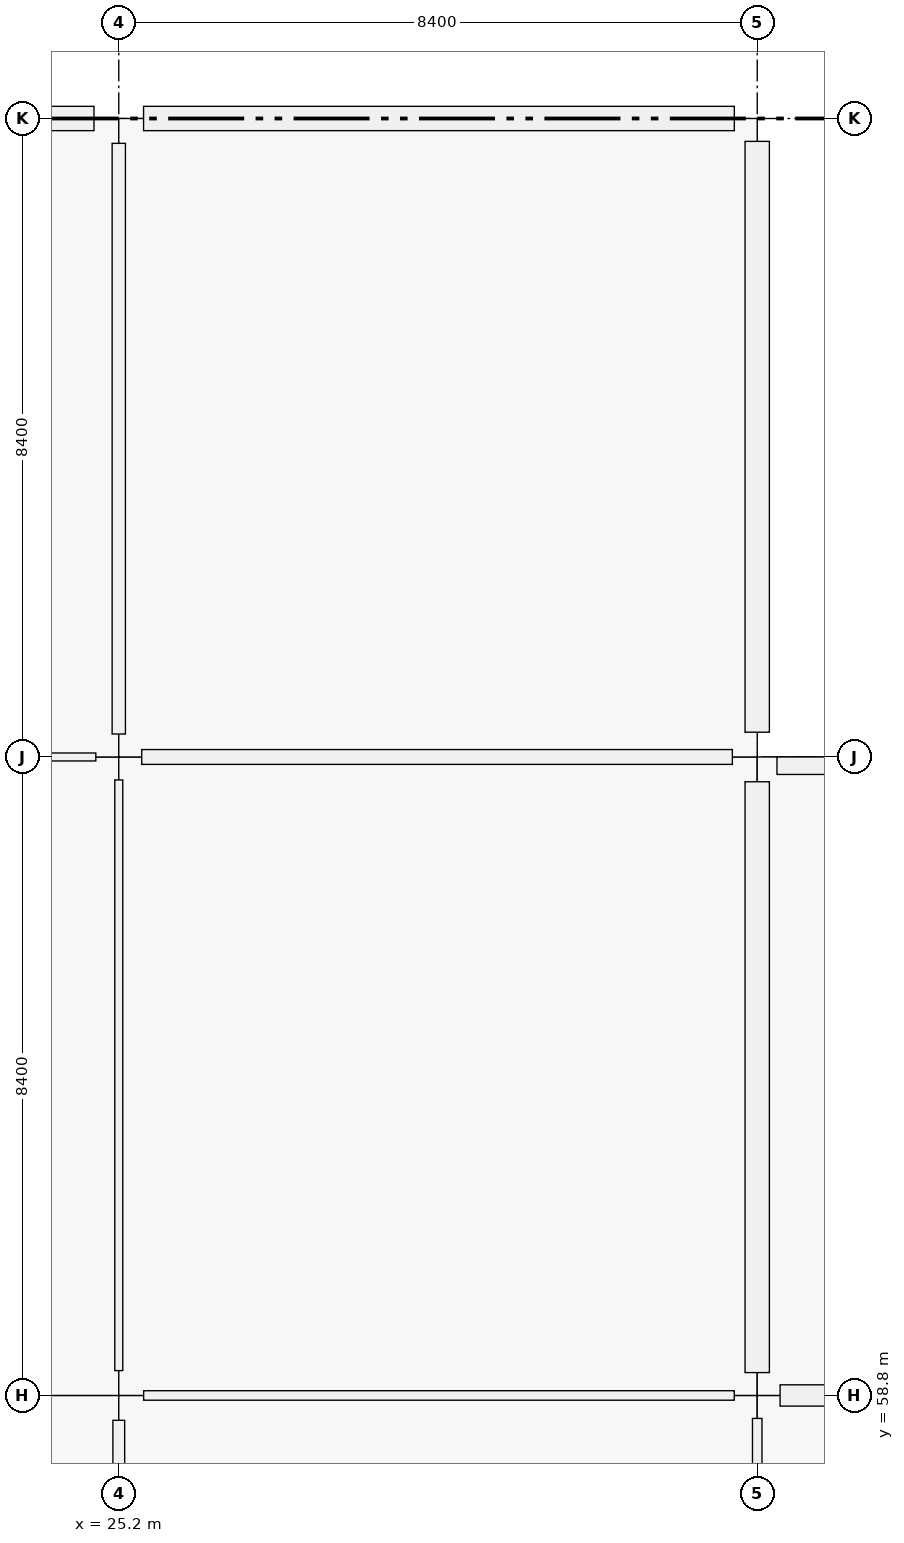
"""IFC4 building model, lengths in metres.
Left out: names, types, materials, properties, quantities, classifications, styles, units other than length and angle.
Written with IfcOpenShell. Run it as: python <this file> out.ifc"""

import sys

from ifc_helpers import new_model, si_unit, direction, frame, frame_2d, origin, origin_2d, place, context, subcontext, project, spatial, rectangle, extrude, element, fill, save


model = new_model("IFC4")
c1 = context("Model", 3, precision=1e-05, world=origin(), true_north=direction((0.0, 1.0)))
c2 = subcontext(c1, "Body", "Model", "MODEL_VIEW")
j1 = project(units=[si_unit("LENGTHUNIT", "METRE"), si_unit("PLANEANGLEUNIT", "RADIAN")], contexts=[c1])
p1 = place(None, origin())
s1 = spatial("IfcSite", under=j1, at=p1, CompositionType="ELEMENT")
p2 = place(p1, origin())
s2 = spatial("IfcBuilding", under=s1, at=p2, CompositionType="ELEMENT")
p3 = place(p2, frame((0.0, 0.0, 14.76)))
s3 = spatial("IfcBuildingStorey", under=s2, at=p3, CompositionType="ELEMENT", Elevation=14.76)
p4 = place(p3, frame((25.2, 58.8, 0.0), z_axis=(0.0, 0.0, 1.0), x_axis=(1.0, 0.0, 0.0)))
e1 = element("IfcColumn", 1, at=p4, inside=s3, PredefinedType="COLUMN", context=c2, shape_type="SweptSolid", body=[
    extrude(rectangle(XDim=0.65, YDim=0.65, at=origin_2d()), origin(), (0.0, 0.0, 1.0), 4.32),
])
p5 = place(p3, frame((25.2, 67.2, 0.0), z_axis=(0.0, 0.0, 1.0), x_axis=(1.0, 0.0, 0.0)))
e2 = element("IfcColumn", 2, at=p5, inside=s3, PredefinedType="COLUMN", context=c2, shape_type="SweptSolid", body=[
    extrude(rectangle(XDim=0.6, YDim=0.6, at=origin_2d()), origin(), (0.0, 0.0, 1.0), 4.32),
])
p6 = place(p3, frame((25.2, 75.6, 0.0), z_axis=(0.0, 0.0, 1.0), x_axis=(1.0, 0.0, 0.0)))
e3 = element("IfcColumn", 3, at=p6, inside=s3, PredefinedType="COLUMN", context=c2, shape_type="SweptSolid", body=[
    extrude(rectangle(XDim=0.65, YDim=0.65, at=origin_2d()), origin(), (0.0, 0.0, 1.0), 4.32),
])
p7 = place(p3, frame((33.6, 58.8, 0.0), z_axis=(0.0, 0.0, 1.0), x_axis=(1.0, 0.0, 0.0)))
e4 = element("IfcColumn", 4, at=p7, inside=s3, PredefinedType="COLUMN", context=c2, shape_type="SweptSolid", body=[
    extrude(rectangle(XDim=0.6, YDim=0.6, at=origin_2d()), origin(), (0.0, 0.0, 1.0), 4.32),
])
p8 = place(p3, frame((33.6, 67.2, 0.0), z_axis=(0.0, 0.0, 1.0), x_axis=(1.0, 0.0, 0.0)))
e5 = element("IfcColumn", 5, at=p8, inside=s3, PredefinedType="COLUMN", context=c2, shape_type="SweptSolid", body=[
    extrude(rectangle(XDim=0.65, YDim=0.65, at=origin_2d()), origin(), (0.0, 0.0, 1.0), 4.32),
])
p9 = place(p3, frame((33.6, 75.6, 0.0), z_axis=(0.0, 0.0, 1.0), x_axis=(1.0, 0.0, 0.0)))
e6 = element("IfcColumn", 6, at=p9, inside=s3, PredefinedType="COLUMN", context=c2, shape_type="SweptSolid", body=[
    extrude(rectangle(XDim=0.6, YDim=0.6, at=origin_2d()), origin(), (0.0, 0.0, 1.0), 4.32),
])
p10 = place(p3, frame((17.101, 75.6, 0.0), z_axis=(0.0, 0.0, 1.0), x_axis=(1.0, 0.0, 0.0)))
e7 = element("IfcWall", 7, at=p10, inside=s3, PredefinedType="SOLIDWALL", context=c2, shape_type="SweptSolid", body=[
    extrude(rectangle(XDim=7.773, YDim=0.32, at=frame_2d((3.886, 0.0))), origin(), (0.0, 0.0, 1.0), 3.37),
])
p11 = place(p10, frame((2.986, 0.0, 0.9)))
e8 = element("IfcOpeningElement", 8, at=p11, cuts=e7, PredefinedType="OPENING", context=c2, shape_type="SweptSolid", body=[
    extrude(rectangle(XDim=1.8, YDim=1.35, at=frame_2d((0.9, 0.675))), frame((0.0, 0.16, 0.0), z_axis=(0.0, -1.0, 0.0), x_axis=(1.0, 0.0, 0.0)), (0.0, 0.0, 1.0), 0.32),
])
p12 = place(p3, frame((33.6, 66.874, 0.0), z_axis=(0.0, 0.0, 1.0), x_axis=(0.0, -1.0, 0.0)))
e9 = element("IfcWall", 9, at=p12, inside=s3, PredefinedType="SOLIDWALL", context=c2, shape_type="SweptSolid", body=[
    extrude(rectangle(XDim=7.773, YDim=0.32, at=frame_2d((3.886, 0.0))), origin(), (0.0, 0.0, 1.0), 3.37),
])
p13 = place(p12, frame((2.286, 0.0, 0.9)))
e10 = element("IfcOpeningElement", 10, at=p13, cuts=e9, PredefinedType="OPENING", context=c2, shape_type="SweptSolid", body=[
    extrude(rectangle(XDim=3.2, YDim=1.75, at=frame_2d((1.6, 0.875))), frame((0.0, 0.16, 0.0), z_axis=(0.0, -1.0, 0.0), x_axis=(1.0, 0.0, 0.0)), (0.0, 0.0, 1.0), 0.32),
])
p14 = place(p3, frame((25.526, 75.6, 0.0), z_axis=(0.0, 0.0, 1.0), x_axis=(1.0, 0.0, 0.0)))
e11 = element("IfcWall", 11, at=p14, inside=s3, PredefinedType="SOLIDWALL", context=c2, shape_type="SweptSolid", body=[
    extrude(rectangle(XDim=7.773, YDim=0.32, at=frame_2d((3.887, 0.0))), origin(), (0.0, 0.0, 1.0), 3.37),
])
p15 = place(p14, frame((2.636, 0.0, 0.9)))
e12 = element("IfcOpeningElement", 12, at=p15, cuts=e11, PredefinedType="OPENING", context=c2, shape_type="SweptSolid", body=[
    extrude(rectangle(XDim=2.5, YDim=1.65, at=frame_2d((1.25, 0.825))), frame((0.0, 0.16, 0.0), z_axis=(0.0, -1.0, 0.0), x_axis=(1.0, 0.0, 0.0)), (0.0, 0.0, 1.0), 0.32),
])
p16 = place(p3, frame((33.6, 75.299, 0.0), z_axis=(0.0, 0.0, 1.0), x_axis=(0.0, -1.0, 0.0)))
e13 = element("IfcWall", 13, at=p16, inside=s3, PredefinedType="SOLIDWALL", context=c2, shape_type="SweptSolid", body=[
    extrude(rectangle(XDim=7.773, YDim=0.32, at=frame_2d((3.887, 0.0))), origin(), (0.0, 0.0, 1.0), 3.37),
])
p17 = place(p3, frame((33.901, 58.8, 0.0), z_axis=(0.0, 0.0, 1.0), x_axis=(1.0, 0.0, 0.0)))
e14 = element("IfcWall", 14, at=p17, inside=s3, PredefinedType="SOLIDWALL", context=c2, shape_type="SweptSolid", body=[
    extrude(rectangle(XDim=7.823, YDim=0.28, at=frame_2d((3.912, 0.0))), origin(), (0.0, 0.0, 1.0), 3.37),
])
p18 = place(p3, frame((33.86, 67.085, 0.0), z_axis=(0.0, 0.0, 1.0), x_axis=(1.0, 0.0, 0.0)))
e15 = element("IfcWall", 15, at=p18, inside=s3, PredefinedType="PARAPET", context=c2, shape_type="SweptSolid", body=[
    extrude(rectangle(XDim=7.88, YDim=0.23, at=frame_2d((3.94, 0.0))), origin(), (0.0, 0.0, 1.0), 0.95),
])
p19 = place(p3, frame((17.127, 67.2, 0.0), z_axis=(0.0, 0.0, 1.0), x_axis=(1.0, 0.0, 0.0)))
e16 = element("IfcWall", 16, at=p19, inside=s3, PredefinedType="PARTITIONING", context=c2, shape_type="SweptSolid", body=[
    extrude(rectangle(XDim=7.771, YDim=0.105, at=frame_2d((3.885, 0.0))), origin(), (0.0, 0.0, 1.0), 3.19),
])
p20 = place(p19, frame((3.356, 0.0, 0.0)))
e17 = element("IfcOpeningElement", 17, at=p20, cuts=e16, PredefinedType="OPENING", context=c2, shape_type="SweptSolid", body=[
    extrude(rectangle(XDim=1.06, YDim=2.25, at=frame_2d((0.53, 1.125))), frame((0.0, 0.052, 0.0), z_axis=(0.0, -1.0, 0.0), x_axis=(1.0, 0.0, 0.0)), (0.0, 0.0, 1.0), 0.105),
])
p21 = place(p3, frame((25.527, 58.8, 0.0), z_axis=(0.0, 0.0, 1.0), x_axis=(1.0, 0.0, 0.0)))
e18 = element("IfcWall", 18, at=p21, inside=s3, PredefinedType="PARTITIONING", context=c2, shape_type="SweptSolid", body=[
    extrude(rectangle(XDim=7.771, YDim=0.125, at=frame_2d((3.885, 0.0))), origin(), (0.0, 0.0, 1.0), 3.19),
])
p22 = place(p21, frame((3.401, 0.0, 0.0)))
e19 = element("IfcOpeningElement", 19, at=p22, cuts=e18, PredefinedType="OPENING", context=c2, shape_type="SweptSolid", body=[
    extrude(rectangle(XDim=0.97, YDim=2.12, at=frame_2d((0.485, 1.06))), frame((0.0, 0.062, 0.0), z_axis=(0.0, -1.0, 0.0), x_axis=(1.0, 0.0, 0.0)), (0.0, 0.0, 1.0), 0.125),
])
p23 = place(p3, frame((25.502, 67.2, 0.0), z_axis=(0.0, 0.0, 1.0), x_axis=(1.0, 0.0, 0.0)))
e20 = element("IfcWall", 20, at=p23, inside=s3, PredefinedType="PARTITIONING", context=c2, shape_type="SweptSolid", body=[
    extrude(rectangle(XDim=7.771, YDim=0.195, at=frame_2d((3.885, 0.0))), origin(), (0.0, 0.0, 1.0), 3.19),
])
p24 = place(p23, frame((3.401, 0.0, 0.0)))
e21 = element("IfcOpeningElement", 21, at=p24, cuts=e20, PredefinedType="OPENING", context=c2, shape_type="SweptSolid", body=[
    extrude(rectangle(XDim=0.97, YDim=2.12, at=frame_2d((0.485, 1.06))), frame((0.0, 0.098, 0.0), z_axis=(0.0, -1.0, 0.0), x_axis=(1.0, 0.0, 0.0)), (0.0, 0.0, 1.0), 0.195),
])
p25 = place(p3, frame((25.2, 50.702, 0.0), z_axis=(0.0, 0.0, 1.0), x_axis=(0.0, 1.0, 0.0)))
e22 = element("IfcWall", 22, at=p25, inside=s3, PredefinedType="PARTITIONING", context=c2, shape_type="SweptSolid", body=[
    extrude(rectangle(XDim=7.771, YDim=0.155, at=frame_2d((3.885, 0.0))), origin(), (0.0, 0.0, 1.0), 3.19),
])
p26 = place(p25, frame((3.385, 0.0, 0.0)))
e23 = element("IfcOpeningElement", 23, at=p26, cuts=e22, PredefinedType="OPENING", context=c2, shape_type="SweptSolid", body=[
    extrude(rectangle(XDim=1.0, YDim=2.2, at=frame_2d((0.5, 1.1))), frame((0.0, 0.078, 0.0), z_axis=(0.0, -1.0, 0.0), x_axis=(1.0, 0.0, 0.0)), (0.0, 0.0, 1.0), 0.155),
])
p27 = place(p3, frame((25.2, 59.127, 0.0), z_axis=(0.0, 0.0, 1.0), x_axis=(0.0, 1.0, 0.0)))
e24 = element("IfcWall", 24, at=p27, inside=s3, PredefinedType="PARTITIONING", context=c2, shape_type="SweptSolid", body=[
    extrude(rectangle(XDim=7.771, YDim=0.105, at=frame_2d((3.885, 0.0))), origin(), (0.0, 0.0, 1.0), 3.19),
])
p28 = place(p27, frame((3.396, 0.0, 0.0)))
e25 = element("IfcOpeningElement", 25, at=p28, cuts=e24, PredefinedType="OPENING", context=c2, shape_type="SweptSolid", body=[
    extrude(rectangle(XDim=0.98, YDim=2.18, at=frame_2d((0.49, 1.09))), frame((0.0, 0.052, 0.0), z_axis=(0.0, -1.0, 0.0), x_axis=(1.0, 0.0, 0.0)), (0.0, 0.0, 1.0), 0.105),
])
p29 = place(p3, frame((25.2, 67.502, 0.0), z_axis=(0.0, 0.0, 1.0), x_axis=(0.0, 1.0, 0.0)))
e26 = element("IfcWall", 26, at=p29, inside=s3, PredefinedType="PARTITIONING", context=c2, shape_type="SweptSolid", body=[
    extrude(rectangle(XDim=7.771, YDim=0.175, at=frame_2d((3.885, 0.0))), origin(), (0.0, 0.0, 1.0), 3.19),
])
p30 = place(p29, frame((3.356, 0.0, 0.0)))
e27 = element("IfcOpeningElement", 27, at=p30, cuts=e26, PredefinedType="OPENING", context=c2, shape_type="SweptSolid", body=[
    extrude(rectangle(XDim=1.06, YDim=2.25, at=frame_2d((0.53, 1.125))), frame((0.0, 0.087, 0.0), z_axis=(0.0, -1.0, 0.0), x_axis=(1.0, 0.0, 0.0)), (0.0, 0.0, 1.0), 0.175),
])
p31 = place(p3, frame((33.6, 50.727, 0.0), z_axis=(0.0, 0.0, 1.0), x_axis=(0.0, 1.0, 0.0)))
e28 = element("IfcWall", 28, at=p31, inside=s3, PredefinedType="PARTITIONING", context=c2, shape_type="SweptSolid", body=[
    extrude(rectangle(XDim=7.771, YDim=0.125, at=frame_2d((3.885, 0.0))), origin(), (0.0, 0.0, 1.0), 3.19),
])
p32 = place(p31, frame((3.365, 0.0, 0.0)))
e29 = element("IfcOpeningElement", 29, at=p32, cuts=e28, PredefinedType="OPENING", context=c2, shape_type="SweptSolid", body=[
    extrude(rectangle(XDim=1.04, YDim=2.2, at=frame_2d((0.52, 1.1))), frame((0.0, 0.062, 0.0), z_axis=(0.0, -1.0, 0.0), x_axis=(1.0, 0.0, 0.0)), (0.0, 0.0, 1.0), 0.125),
])
p33 = place(p13, origin())
e30 = element("IfcWindow", 30, at=p33, inside=s3, PartitioningType="SINGLE_PANEL", PredefinedType="WINDOW", context=c2, shape_type="SweptSolid", body=[
    extrude(rectangle(XDim=3.2, YDim=1.75, at=frame_2d((1.6, 0.875))), frame((0.0, 0.03, 0.0), z_axis=(0.0, -1.0, 0.0), x_axis=(1.0, 0.0, 0.0)), (0.0, 0.0, 1.0), 0.06),
])
fill(e10, e30)
p34 = place(p15, origin())
e31 = element("IfcWindow", 31, at=p34, inside=s3, PartitioningType="SINGLE_PANEL", PredefinedType="WINDOW", context=c2, shape_type="SweptSolid", body=[
    extrude(rectangle(XDim=2.5, YDim=1.65, at=frame_2d((1.25, 0.825))), frame((0.0, 0.03, 0.0), z_axis=(0.0, -1.0, 0.0), x_axis=(1.0, 0.0, 0.0)), (0.0, 0.0, 1.0), 0.06),
])
fill(e12, e31)
p35 = place(p28, origin())
e32 = element("IfcDoor", 32, at=p35, inside=s3, OperationType="SINGLE_SWING_RIGHT", PredefinedType="DOOR", context=c2, shape_type="SweptSolid", body=[
    extrude(rectangle(XDim=0.98, YDim=2.18, at=frame_2d((0.49, 1.09))), frame((0.0, 0.025, 0.0), z_axis=(0.0, -1.0, 0.0), x_axis=(1.0, 0.0, 0.0)), (0.0, 0.0, 1.0), 0.05),
])
fill(e25, e32)
p36 = place(p24, origin())
e33 = element("IfcDoor", 33, at=p36, inside=s3, OperationType="SINGLE_SWING_RIGHT", PredefinedType="DOOR", context=c2, shape_type="SweptSolid", body=[
    extrude(rectangle(XDim=0.97, YDim=2.12, at=frame_2d((0.485, 1.06))), frame((0.0, 0.025, 0.0), z_axis=(0.0, -1.0, 0.0), x_axis=(1.0, 0.0, 0.0)), (0.0, 0.0, 1.0), 0.05),
])
fill(e21, e33)
p37 = place(p22, origin())
e34 = element("IfcDoor", 34, at=p37, inside=s3, OperationType="SINGLE_SWING_LEFT", PredefinedType="DOOR", context=c2, shape_type="SweptSolid", body=[
    extrude(rectangle(XDim=0.97, YDim=2.12, at=frame_2d((0.485, 1.06))), frame((0.0, 0.025, 0.0), z_axis=(0.0, -1.0, 0.0), x_axis=(1.0, 0.0, 0.0)), (0.0, 0.0, 1.0), 0.05),
])
fill(e19, e34)
p38 = place(p30, origin())
e35 = element("IfcDoor", 35, at=p38, inside=s3, OperationType="SINGLE_SWING_RIGHT", PredefinedType="DOOR", context=c2, shape_type="SweptSolid", body=[
    extrude(rectangle(XDim=1.06, YDim=2.25, at=frame_2d((0.53, 1.125))), frame((0.0, 0.025, 0.0), z_axis=(0.0, -1.0, 0.0), x_axis=(1.0, 0.0, 0.0)), (0.0, 0.0, 1.0), 0.05),
])
fill(e27, e35)
save(model, sys.argv[1])
